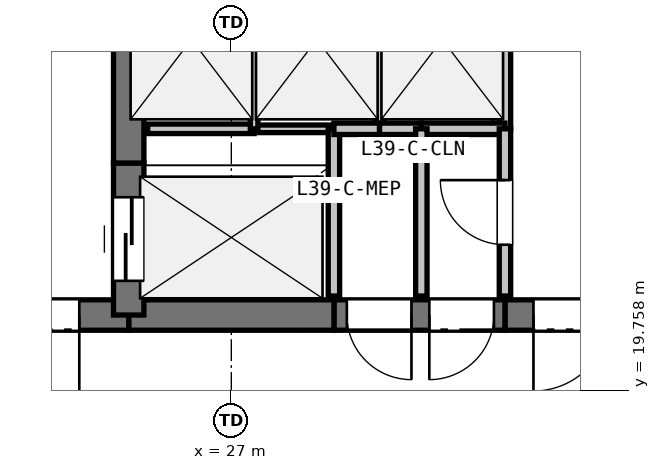
"""IFC4 building model, lengths in metres.
Left out: names, types, materials, properties, quantities, classifications, styles, units other than length and angle.
Written with IfcOpenShell. Run it as: python <this file> out.ifc"""

import sys

from ifc_helpers import new_model, si_unit, direction, frame, frame_2d, origin, place, context, subcontext, project, spatial, rectangle, extrude, element, fill, save


model = new_model("IFC4")
c1 = context("Model", 3, precision=1e-05, world=origin(), true_north=direction((0.0, 1.0)))
c2 = subcontext(c1, "Body", "Model", "MODEL_VIEW")
j1 = project(units=[si_unit("LENGTHUNIT", "METRE"), si_unit("PLANEANGLEUNIT", "RADIAN")], contexts=[c1])
p1 = place(None, origin())
s1 = spatial("IfcSite", under=j1, at=p1, CompositionType="ELEMENT")
p2 = place(p1, origin())
s2 = spatial("IfcBuilding", under=s1, at=p2, CompositionType="ELEMENT")
p3 = place(p2, frame((0.0, 0.0, 141.0)))
s3 = spatial("IfcBuildingStorey", under=s2, at=p3, CompositionType="ELEMENT", Elevation=141.0)
p4 = place(p3, frame((32.35, 20.75, 0.0), z_axis=(0.0, 0.0, 1.0), x_axis=(-1.0, 0.0, 0.0)))
e1 = element("IfcWall", 1, at=p4, inside=s3, PredefinedType="SHEAR", context=c2, shape_type="SweptSolid", body=[
    extrude(rectangle(XDim=1.75, YDim=0.4, at=frame_2d((0.875, 0.0))), origin(), (0.0, 0.0, 1.0), 3.06),
])
p5 = place(p4, frame((0.375, 0.0, 0.0)))
e2 = element("IfcOpeningElement", 2, at=p5, cuts=e1, PredefinedType="OPENING", context=c2, shape_type="SweptSolid", body=[
    extrude(rectangle(XDim=1.0, YDim=2.15, at=frame_2d((0.5, 1.075))), frame((0.0, 0.21, 0.0), z_axis=(0.0, -1.0, 0.0), x_axis=(1.0, 0.0, 0.0)), (0.0, 0.0, 1.0), 0.42),
])
p6 = place(p3, frame((30.6, 20.75, 0.0), z_axis=(0.0, 0.0, 1.0), x_axis=(-1.0, 0.0, 0.0)))
e3 = element("IfcWall", 3, at=p6, inside=s3, PredefinedType="SHEAR", context=c2, shape_type="SweptSolid", body=[
    extrude(rectangle(XDim=2.25, YDim=0.4, at=frame_2d((1.125, 0.0))), origin(), (0.0, 0.0, 1.0), 3.06),
])
p7 = place(p6, frame((1.23, 0.0, 0.0)))
e4 = element("IfcOpeningElement", 4, at=p7, cuts=e3, PredefinedType="OPENING", context=c2, shape_type="SweptSolid", body=[
    extrude(rectangle(XDim=0.85, YDim=2.1, at=frame_2d((0.425, 1.05))), frame((0.0, 0.21, 0.0), z_axis=(0.0, -1.0, 0.0), x_axis=(1.0, 0.0, 0.0)), (0.0, 0.0, 1.0), 0.42),
])
p8 = place(p6, frame((0.145, 0.0, 0.0)))
e5 = element("IfcOpeningElement", 5, at=p8, cuts=e3, PredefinedType="OPENING", context=c2, shape_type="SweptSolid", body=[
    extrude(rectangle(XDim=0.85, YDim=2.1, at=frame_2d((0.425, 1.05))), frame((0.0, 0.21, 0.0), z_axis=(0.0, -1.0, 0.0), x_axis=(1.0, 0.0, 0.0)), (0.0, 0.0, 1.0), 0.42),
])
p9 = place(p3, frame((28.35, 20.75, 0.0), z_axis=(0.0, 0.0, 1.0), x_axis=(-1.0, 0.0, 0.0)))
e6 = element("IfcWall", 6, at=p9, inside=s3, PredefinedType="SHEAR", context=c2, shape_type="SweptSolid", body=[
    extrude(rectangle(XDim=2.7, YDim=0.4, at=frame_2d((1.35, 0.0))), origin(), (0.0, 0.0, 1.0), 3.06),
])
p10 = place(p3, frame((25.65, 20.75, 0.0), z_axis=(0.0, 0.0, 1.0), x_axis=(-1.0, 0.0, 0.0)))
e7 = element("IfcWall", 7, at=p10, inside=s3, PredefinedType="SHEAR", context=c2, shape_type="SweptSolid", body=[
    extrude(rectangle(XDim=3.45, YDim=0.4, at=frame_2d((1.725, 0.0))), origin(), (0.0, 0.0, 1.0), 3.06),
])
p11 = place(p10, frame((0.65, 0.0, 0.0)))
e8 = element("IfcOpeningElement", 8, at=p11, cuts=e7, PredefinedType="OPENING", context=c2, shape_type="SweptSolid", body=[
    extrude(rectangle(XDim=1.15, YDim=2.15, at=frame_2d((0.575, 1.075))), frame((0.0, 0.21, 0.0), z_axis=(0.0, -1.0, 0.0), x_axis=(1.0, 0.0, 0.0)), (0.0, 0.0, 1.0), 0.42),
])
p12 = place(p3, frame((25.65, 20.75, 0.0), z_axis=(0.0, 0.0, 1.0), x_axis=(0.0, 1.0, 0.0)))
e9 = element("IfcWall", 9, at=p12, inside=s3, PredefinedType="SHEAR", context=c2, shape_type="SweptSolid", body=[
    extrude(rectangle(XDim=2.0, YDim=0.4, at=frame_2d((1.0, 0.0))), origin(), (0.0, 0.0, 1.0), 3.06),
])
p13 = place(p12, frame((0.45, 0.0, 0.0)))
e10 = element("IfcOpeningElement", 10, at=p13, cuts=e9, PredefinedType="OPENING", context=c2, shape_type="SweptSolid", body=[
    extrude(rectangle(XDim=1.1, YDim=2.15, at=frame_2d((0.55, 1.075))), frame((0.0, 0.21, 0.0), z_axis=(0.0, -1.0, 0.0), x_axis=(1.0, 0.0, 0.0)), (0.0, 0.0, 1.0), 0.42),
])
p14 = place(p3, frame((25.65, 22.75, 0.0), z_axis=(0.0, 0.0, 1.0), x_axis=(0.0, 1.0, 0.0)))
e11 = element("IfcWall", 11, at=p14, inside=s3, PredefinedType="SHEAR", context=c2, shape_type="SweptSolid", body=[
    extrude(rectangle(XDim=2.8, YDim=0.4, at=frame_2d((1.4, 0.0))), origin(), (0.0, 0.0, 1.0), 3.06),
])
p15 = place(p3, frame((25.9, 23.2, 0.0), z_axis=(0.0, 0.0, 1.0), x_axis=(1.0, 0.0, 0.0)))
e12 = element("IfcWall", 12, at=p15, inside=s3, PredefinedType="PARTITIONING", context=c2, shape_type="SweptSolid", body=[
    extrude(rectangle(XDim=1.4, YDim=0.125, at=frame_2d((0.7, 0.0))), origin(), (0.0, 0.0, 1.0), 3.06),
])
p16 = place(p3, frame((27.3, 23.2, 0.0), z_axis=(0.0, 0.0, 1.0), x_axis=(1.0, 0.0, 0.0)))
e13 = element("IfcWall", 13, at=p16, inside=s3, PredefinedType="PARTITIONING", context=c2, shape_type="SweptSolid", body=[
    extrude(rectangle(XDim=1.05, YDim=0.1, at=frame_2d((0.525, 0.0))), origin(), (0.0, 0.0, 1.0), 3.06),
])
p17 = place(p3, frame((28.35, 23.2, 0.0), z_axis=(0.0, 0.0, 1.0), x_axis=(0.0, -1.0, 0.0)))
e14 = element("IfcWall", 14, at=p17, inside=s3, PredefinedType="PARTITIONING", context=c2, shape_type="SweptSolid", body=[
    extrude(rectangle(XDim=2.2, YDim=0.15, at=frame_2d((1.1, 0.0))), origin(), (0.0, 0.0, 1.0), 3.06),
])
p18 = place(p3, frame((27.3, 25.4, 0.0), z_axis=(0.0, 0.0, 1.0), x_axis=(0.0, -1.0, 0.0)))
e15 = element("IfcWall", 15, at=p18, inside=s3, PredefinedType="PARTITIONING", context=c2, shape_type="SweptSolid", body=[
    extrude(rectangle(XDim=2.2, YDim=0.1, at=frame_2d((1.1, 0.0))), origin(), (0.0, 0.0, 1.0), 3.06),
])
p19 = place(p3, frame((28.95, 25.4, 0.0), z_axis=(0.0, 0.0, 1.0), x_axis=(0.0, -1.0, 0.0)))
e16 = element("IfcWall", 16, at=p19, inside=s3, PredefinedType="PARTITIONING", context=c2, shape_type="SweptSolid", body=[
    extrude(rectangle(XDim=2.2, YDim=0.125, at=frame_2d((1.1, 0.0))), origin(), (0.0, 0.0, 1.0), 3.06),
])
p20 = place(p3, frame((28.95, 23.2, 0.0), z_axis=(0.0, 0.0, 1.0), x_axis=(-1.0, 0.0, 0.0)))
e17 = element("IfcWall", 17, at=p20, inside=s3, PredefinedType="PARTITIONING", context=c2, shape_type="SweptSolid", body=[
    extrude(rectangle(XDim=0.6, YDim=0.15, at=frame_2d((0.3, 0.0))), origin(), (0.0, 0.0, 1.0), 3.06),
])
p21 = place(p3, frame((30.6, 25.4, 0.0), z_axis=(0.0, 0.0, 1.0), x_axis=(0.0, -1.0, 0.0)))
e18 = element("IfcWall", 18, at=p21, inside=s3, PredefinedType="PARTITIONING", context=c2, shape_type="SweptSolid", body=[
    extrude(rectangle(XDim=2.2, YDim=0.15, at=frame_2d((1.1, 0.0))), origin(), (0.0, 0.0, 1.0), 3.06),
])
p22 = place(p3, frame((30.6, 23.2, 0.0), z_axis=(0.0, 0.0, 1.0), x_axis=(-1.0, 0.0, 0.0)))
e19 = element("IfcWall", 19, at=p22, inside=s3, PredefinedType="PARTITIONING", context=c2, shape_type="SweptSolid", body=[
    extrude(rectangle(XDim=1.1, YDim=0.15, at=frame_2d((0.55, 0.0))), origin(), (0.0, 0.0, 1.0), 3.06),
])
p23 = place(p3, frame((29.5, 23.2, 0.0), z_axis=(0.0, 0.0, 1.0), x_axis=(-1.0, 0.0, 0.0)))
e20 = element("IfcWall", 20, at=p23, inside=s3, PredefinedType="PARTITIONING", context=c2, shape_type="SweptSolid", body=[
    extrude(rectangle(XDim=0.55, YDim=0.15, at=frame_2d((0.275, 0.0))), origin(), (0.0, 0.0, 1.0), 3.06),
])
p24 = place(p3, frame((30.6, 21.0, 0.0), z_axis=(0.0, 0.0, 1.0), x_axis=(0.0, 1.0, 0.0)))
e21 = element("IfcWall", 21, at=p24, inside=s3, PredefinedType="PARTITIONING", context=c2, shape_type="SweptSolid", body=[
    extrude(rectangle(XDim=2.2, YDim=0.15, at=frame_2d((1.1, 0.0))), origin(), (0.0, 0.0, 1.0), 3.06),
])
p25 = place(p24, frame((0.675, 0.0, 0.0)))
e22 = element("IfcOpeningElement", 22, at=p25, cuts=e21, PredefinedType="OPENING", context=c2, shape_type="SweptSolid", body=[
    extrude(rectangle(XDim=0.85, YDim=2.1, at=frame_2d((0.425, 1.05))), frame((0.0, 0.085, 0.0), z_axis=(0.0, -1.0, 0.0), x_axis=(1.0, 0.0, 0.0)), (0.0, 0.0, 1.0), 0.17),
])
p26 = place(p3, frame((29.5, 23.2, 0.0), z_axis=(0.0, 0.0, 1.0), x_axis=(0.0, -1.0, 0.0)))
e23 = element("IfcWall", 23, at=p26, inside=s3, PredefinedType="PARTITIONING", context=c2, shape_type="SweptSolid", body=[
    extrude(rectangle(XDim=2.2, YDim=0.15, at=frame_2d((1.1, 0.0))), origin(), (0.0, 0.0, 1.0), 3.06),
])
p27 = place(p5, origin())
e24 = element("IfcDoor", 24, at=p27, inside=s3, OperationType="SINGLE_SWING_RIGHT", PredefinedType="DOOR", context=c2, shape_type="SweptSolid", body=[
    extrude(rectangle(XDim=1.0, YDim=2.15, at=frame_2d((0.5, 1.075))), frame((0.0, 0.025, 0.0), z_axis=(0.0, -1.0, 0.0), x_axis=(1.0, 0.0, 0.0)), (0.0, 0.0, 1.0), 0.05),
])
fill(e2, e24)
p28 = place(p13, origin())
e25 = element("IfcDoor", 25, at=p28, inside=s3, OperationType="SLIDING_TO_LEFT", PredefinedType="DOOR", context=c2, shape_type="SweptSolid", body=[
    extrude(rectangle(XDim=1.1, YDim=2.15, at=frame_2d((0.55, 1.075))), frame((0.0, 0.025, 0.0), z_axis=(0.0, -1.0, 0.0), x_axis=(1.0, 0.0, 0.0)), (0.0, 0.0, 1.0), 0.05),
])
fill(e10, e25)
p29 = place(p11, origin())
e26 = element("IfcDoor", 26, at=p29, inside=s3, OperationType="SINGLE_SWING_LEFT", PredefinedType="DOOR", context=c2, shape_type="SweptSolid", body=[
    extrude(rectangle(XDim=1.15, YDim=2.15, at=frame_2d((0.575, 1.075))), frame((0.0, 0.025, 0.0), z_axis=(0.0, -1.0, 0.0), x_axis=(1.0, 0.0, 0.0)), (0.0, 0.0, 1.0), 0.05),
])
fill(e8, e26)
p30 = place(p25, origin())
e27 = element("IfcDoor", 27, at=p30, inside=s3, OperationType="SINGLE_SWING_RIGHT", PredefinedType="DOOR", context=c2, shape_type="SweptSolid", body=[
    extrude(rectangle(XDim=0.85, YDim=2.1, at=frame_2d((0.425, 1.05))), frame((0.0, 0.025, 0.0), z_axis=(0.0, -1.0, 0.0), x_axis=(1.0, 0.0, 0.0)), (0.0, 0.0, 1.0), 0.05),
])
fill(e22, e27)
p31 = place(p7, origin())
e28 = element("IfcDoor", 28, at=p31, inside=s3, OperationType="SINGLE_SWING_LEFT", PredefinedType="DOOR", context=c2, shape_type="SweptSolid", body=[
    extrude(rectangle(XDim=0.85, YDim=2.1, at=frame_2d((0.425, 1.05))), frame((0.0, 0.025, 0.0), z_axis=(0.0, -1.0, 0.0), x_axis=(1.0, 0.0, 0.0)), (0.0, 0.0, 1.0), 0.05),
])
fill(e4, e28)
p32 = place(p8, origin())
e29 = element("IfcDoor", 29, at=p32, inside=s3, OperationType="SINGLE_SWING_RIGHT", PredefinedType="DOOR", context=c2, shape_type="SweptSolid", body=[
    extrude(rectangle(XDim=0.85, YDim=2.1, at=frame_2d((0.425, 1.05))), frame((0.0, 0.025, 0.0), z_axis=(0.0, -1.0, 0.0), x_axis=(1.0, 0.0, 0.0)), (0.0, 0.0, 1.0), 0.05),
])
fill(e5, e29)
save(model, sys.argv[1])
